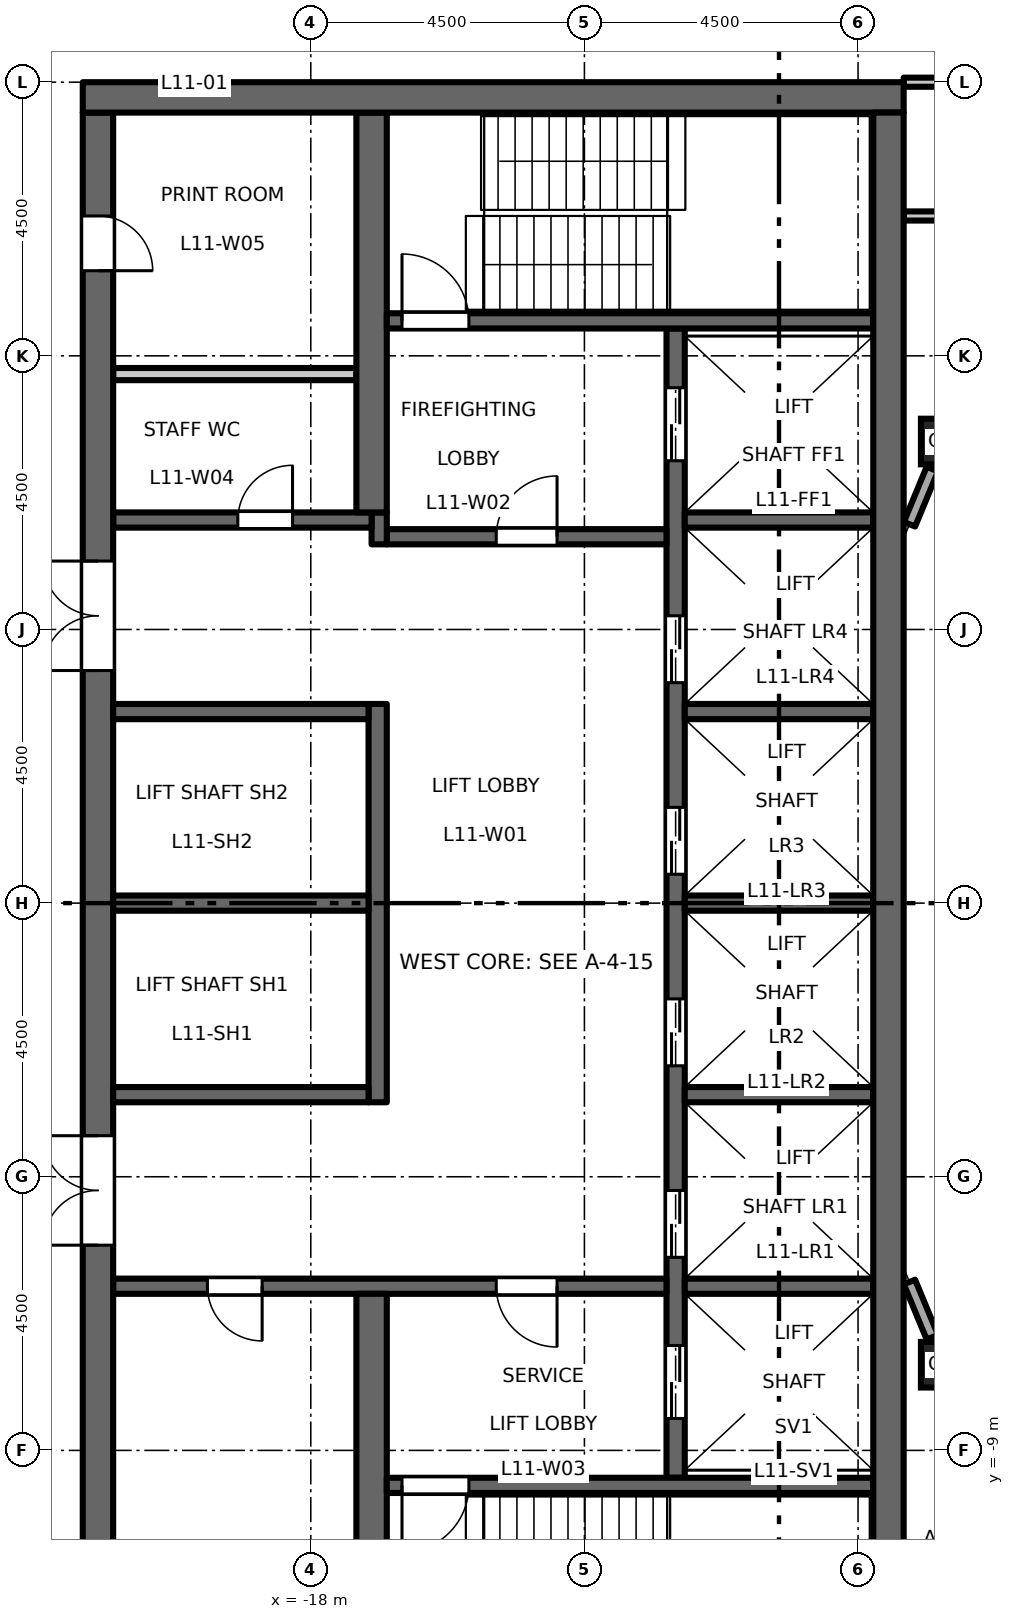
"""IFC4 building model, lengths in metres.
Left out: names, types, materials, properties, quantities, classifications, styles, units other than length and angle.
Written with IfcOpenShell. Run it as: python <this file> out.ifc"""

import sys

from ifc_helpers import new_model, si_unit, direction, frame, frame_2d, origin, origin_2d, place, context, subcontext, project, spatial, rectangle, hollow_rectangle, extrude, element, fill, save


model = new_model("IFC4")
c1 = context("Model", 3, precision=1e-05, world=origin(), true_north=direction((0.0, 1.0)))
c2 = subcontext(c1, "Body", "Model", "MODEL_VIEW")
j1 = project(units=[si_unit("LENGTHUNIT", "METRE"), si_unit("PLANEANGLEUNIT", "RADIAN")], contexts=[c1])
p1 = place(None, origin())
s1 = spatial("IfcSite", under=j1, at=p1, CompositionType="ELEMENT")
p2 = place(p1, origin())
s2 = spatial("IfcBuilding", under=s1, at=p2, CompositionType="ELEMENT")
p3 = place(p2, frame((0.0, 0.0, 53.7)))
s3 = spatial("IfcBuildingStorey", under=s2, at=p3, CompositionType="ELEMENT", Elevation=53.7)
for number, where, z_axis, x_axis in (
    (1, (-7.591, -7.591, 0.0), (0.0, 0.0, 1.0), (1.0, 0.0, 0.0)),
    (2, (-7.591, 7.591, 0.0), (0.0, 0.0, 1.0), (1.0, 0.0, 0.0)),
):
    element("IfcColumn", number, at=place(p3, frame(where, z_axis=z_axis, x_axis=x_axis)), inside=s3, PredefinedType="COLUMN", context=c2, shape_type="SweptSolid", body=[
        extrude(hollow_rectangle(XDim=0.75, YDim=0.75, WallThickness=0.045, at=origin_2d()), origin(), (0.0, 0.0, 1.0), 4.5),
    ])
p4 = place(p3, frame((-12.0, -9.45, 0.0), z_axis=(0.0, 0.0, 1.0), x_axis=(0.0, 1.0, 0.0)))
e3 = element("IfcWall", 3, at=p4, inside=s3, PredefinedType="SHEAR", context=c2, shape_type="SweptSolid", body=[
    extrude(rectangle(XDim=18.9, YDim=0.3, at=frame_2d((9.45, 0.0))), origin(), (0.0, 0.0, 1.0), 4.35),
])
p5 = place(p4, frame((3.625, 0.0, 0.0)))
e4 = element("IfcOpeningElement", 4, at=p5, cuts=e3, PredefinedType="OPENING", context=c2, shape_type="SweptSolid", body=[
    extrude(rectangle(XDim=1.1, YDim=2.1, at=frame_2d((0.55, 1.05))), frame((0.0, 0.16, 0.0), z_axis=(0.0, -1.0, 0.0), x_axis=(1.0, 0.0, 0.0)), (0.0, 0.0, 1.0), 0.32),
])
p6 = place(p4, frame((6.775, 0.0, 0.0)))
e5 = element("IfcOpeningElement", 5, at=p6, cuts=e3, PredefinedType="OPENING", context=c2, shape_type="SweptSolid", body=[
    extrude(rectangle(XDim=1.1, YDim=2.1, at=frame_2d((0.55, 1.05))), frame((0.0, 0.16, 0.0), z_axis=(0.0, -1.0, 0.0), x_axis=(1.0, 0.0, 0.0)), (0.0, 0.0, 1.0), 0.32),
])
p7 = place(p4, frame((9.925, 0.0, 0.0)))
e6 = element("IfcOpeningElement", 6, at=p7, cuts=e3, PredefinedType="OPENING", context=c2, shape_type="SweptSolid", body=[
    extrude(rectangle(XDim=1.1, YDim=2.1, at=frame_2d((0.55, 1.05))), frame((0.0, 0.16, 0.0), z_axis=(0.0, -1.0, 0.0), x_axis=(1.0, 0.0, 0.0)), (0.0, 0.0, 1.0), 0.32),
])
p8 = place(p4, frame((13.075, 0.0, 0.0)))
e7 = element("IfcOpeningElement", 7, at=p8, cuts=e3, PredefinedType="OPENING", context=c2, shape_type="SweptSolid", body=[
    extrude(rectangle(XDim=1.1, YDim=2.1, at=frame_2d((0.55, 1.05))), frame((0.0, 0.16, 0.0), z_axis=(0.0, -1.0, 0.0), x_axis=(1.0, 0.0, 0.0)), (0.0, 0.0, 1.0), 0.32),
])
p9 = place(p4, frame((16.725, 0.0, 0.0)))
e8 = element("IfcOpeningElement", 8, at=p9, cuts=e3, PredefinedType="OPENING", context=c2, shape_type="SweptSolid", body=[
    extrude(rectangle(XDim=1.2, YDim=2.1, at=frame_2d((0.6, 1.05))), frame((0.0, 0.16, 0.0), z_axis=(0.0, -1.0, 0.0), x_axis=(1.0, 0.0, 0.0)), (0.0, 0.0, 1.0), 0.32),
])
p10 = place(p4, frame((0.975, 0.0, 0.0)))
e9 = element("IfcOpeningElement", 9, at=p10, cuts=e3, PredefinedType="OPENING", context=c2, shape_type="SweptSolid", body=[
    extrude(rectangle(XDim=1.2, YDim=2.1, at=frame_2d((0.6, 1.05))), frame((0.0, 0.16, 0.0), z_axis=(0.0, -1.0, 0.0), x_axis=(1.0, 0.0, 0.0)), (0.0, 0.0, 1.0), 0.32),
])
p11 = place(p3, frame((-12.15, 6.025, 0.0), z_axis=(0.0, 0.0, 1.0), x_axis=(-1.0, 0.0, 0.0)))
e10 = element("IfcWall", 10, at=p11, inside=s3, PredefinedType="SHEAR", context=c2, shape_type="SweptSolid", body=[
    extrude(rectangle(XDim=4.6, YDim=0.25, at=frame_2d((2.3, 0.0))), origin(), (0.0, 0.0, 1.0), 4.35),
])
p12 = place(p11, frame((1.8, 0.0, 0.0)))
e11 = element("IfcOpeningElement", 11, at=p12, cuts=e10, PredefinedType="OPENING", context=c2, shape_type="SweptSolid", body=[
    extrude(rectangle(XDim=1.0, YDim=2.1, at=frame_2d((0.5, 1.05))), frame((0.0, 0.135, 0.0), z_axis=(0.0, -1.0, 0.0), x_axis=(1.0, 0.0, 0.0)), (0.0, 0.0, 1.0), 0.27),
])
p13 = place(p3, frame((-16.875, 5.9, 0.0), z_axis=(0.0, 0.0, 1.0), x_axis=(0.0, 1.0, 0.0)))
e12 = element("IfcWall", 12, at=p13, inside=s3, PredefinedType="SHEAR", context=c2, shape_type="SweptSolid", body=[
    extrude(rectangle(XDim=0.525, YDim=0.25, at=frame_2d((0.263, 0.0))), origin(), (0.0, 0.0, 1.0), 4.35),
])
p14 = place(p3, frame((-17.0, 6.3, 0.0), z_axis=(0.0, 0.0, 1.0), x_axis=(-1.0, 0.0, 0.0)))
e13 = element("IfcWall", 13, at=p14, inside=s3, PredefinedType="SHEAR", context=c2, shape_type="SweptSolid", body=[
    extrude(rectangle(XDim=4.25, YDim=0.25, at=frame_2d((2.125, 0.0))), origin(), (0.0, 0.0, 1.0), 4.35),
])
p15 = place(p14, frame((1.3, 0.0, 0.0)))
e14 = element("IfcOpeningElement", 14, at=p15, cuts=e13, PredefinedType="OPENING", context=c2, shape_type="SweptSolid", body=[
    extrude(rectangle(XDim=0.9, YDim=2.1, at=frame_2d((0.45, 1.05))), frame((0.0, 0.135, 0.0), z_axis=(0.0, -1.0, 0.0), x_axis=(1.0, 0.0, 0.0)), (0.0, 0.0, 1.0), 0.27),
])
p16 = place(p3, frame((-12.15, -6.3, 0.0), z_axis=(0.0, 0.0, 1.0), x_axis=(-1.0, 0.0, 0.0)))
e15 = element("IfcWall", 15, at=p16, inside=s3, PredefinedType="SHEAR", context=c2, shape_type="SweptSolid", body=[
    extrude(rectangle(XDim=9.1, YDim=0.25, at=frame_2d((4.55, 0.0))), origin(), (0.0, 0.0, 1.0), 4.35),
])
p17 = place(p16, frame((1.8, 0.0, 0.0)))
e16 = element("IfcOpeningElement", 16, at=p17, cuts=e15, PredefinedType="OPENING", context=c2, shape_type="SweptSolid", body=[
    extrude(rectangle(XDim=1.0, YDim=2.1, at=frame_2d((0.5, 1.05))), frame((0.0, 0.135, 0.0), z_axis=(0.0, -1.0, 0.0), x_axis=(1.0, 0.0, 0.0)), (0.0, 0.0, 1.0), 0.27),
])
p18 = place(p16, frame((6.65, 0.0, 0.0)))
e17 = element("IfcOpeningElement", 17, at=p18, cuts=e15, PredefinedType="OPENING", context=c2, shape_type="SweptSolid", body=[
    extrude(rectangle(XDim=0.9, YDim=2.1, at=frame_2d((0.45, 1.05))), frame((0.0, 0.135, 0.0), z_axis=(0.0, -1.0, 0.0), x_axis=(1.0, 0.0, 0.0)), (0.0, 0.0, 1.0), 0.27),
])
p19 = place(p3, frame((-21.5, -13.0, 0.0), z_axis=(0.0, 0.0, 1.0), x_axis=(0.0, 1.0, 0.0)))
e18 = element("IfcWall", 18, at=p19, inside=s3, PredefinedType="SHEAR", context=c2, shape_type="SweptSolid", body=[
    extrude(rectangle(XDim=26.0, YDim=0.5, at=frame_2d((13.0, 0.0))), origin(), (0.0, 0.0, 1.0), 4.35),
])
p20 = place(p19, frame((16.825, 0.0, 0.0)))
e19 = element("IfcOpeningElement", 19, at=p20, cuts=e18, PredefinedType="OPENING", context=c2, shape_type="SweptSolid", body=[
    extrude(rectangle(XDim=1.8, YDim=2.1, at=frame_2d((0.9, 1.05))), frame((0.0, 0.26, 0.0), z_axis=(0.0, -1.0, 0.0), x_axis=(1.0, 0.0, 0.0)), (0.0, 0.0, 1.0), 0.52),
])
p21 = place(p19, frame((7.375, 0.0, 0.0)))
e20 = element("IfcOpeningElement", 20, at=p21, cuts=e18, PredefinedType="OPENING", context=c2, shape_type="SweptSolid", body=[
    extrude(rectangle(XDim=1.8, YDim=2.1, at=frame_2d((0.9, 1.05))), frame((0.0, 0.26, 0.0), z_axis=(0.0, -1.0, 0.0), x_axis=(1.0, 0.0, 0.0)), (0.0, 0.0, 1.0), 0.52),
])
p22 = place(p19, frame((23.4, 0.0, 0.0)))
e21 = element("IfcOpeningElement", 21, at=p22, cuts=e18, PredefinedType="OPENING", context=c2, shape_type="SweptSolid", body=[
    extrude(rectangle(XDim=0.9, YDim=2.1, at=frame_2d((0.45, 1.05))), frame((0.0, 0.26, 0.0), z_axis=(0.0, -1.0, 0.0), x_axis=(1.0, 0.0, 0.0)), (0.0, 0.0, 1.0), 0.52),
])
p23 = place(p3, frame((-17.25, 8.7, 0.0), z_axis=(0.0, 0.0, 1.0), x_axis=(-1.0, 0.0, 0.0)))
e22 = element("IfcWall", 22, at=p23, inside=s3, PredefinedType="PARTITIONING", context=c2, shape_type="SweptSolid", body=[
    extrude(rectangle(XDim=4.0, YDim=0.2, at=frame_2d((2.0, 0.0))), origin(), (0.0, 0.0, 1.0), 4.35),
])
p24 = place(p3, frame((-16.9, -3.275, 0.0), z_axis=(0.0, 0.0, 1.0), x_axis=(0.0, 1.0, 0.0)))
e23 = element("IfcWall", 23, at=p24, inside=s3, PredefinedType="SHEAR", context=c2, shape_type="SweptSolid", body=[
    extrude(rectangle(XDim=6.55, YDim=0.3, at=frame_2d((3.275, 0.0))), origin(), (0.0, 0.0, 1.0), 4.35),
])
for number, where, z_axis, x_axis in (
    (24, (-17.05, 0.0, 0.0), (0.0, 0.0, 1.0), (-1.0, 0.0, 0.0)),
    (25, (-17.05, 3.15, 0.0), (0.0, 0.0, 1.0), (-1.0, 0.0, 0.0)),
    (26, (-17.05, -3.15, 0.0), (0.0, 0.0, 1.0), (-1.0, 0.0, 0.0)),
):
    element("IfcWall", number, at=place(p3, frame(where, z_axis=z_axis, x_axis=x_axis)), inside=s3, PredefinedType="SHEAR", context=c2, shape_type="SweptSolid", body=[
        extrude(rectangle(XDim=4.2, YDim=0.25, at=frame_2d((2.1, 0.0))), origin(), (0.0, 0.0, 1.0), 4.35),
    ])
for number, where, z_axis, x_axis in (
    (27, (-17.0, 6.425, 0.0), (0.0, 0.0, 1.0), (0.0, 1.0, 0.0)),
    (28, (-17.0, -13.0, 0.0), (0.0, 0.0, 1.0), (0.0, 1.0, 0.0)),
):
    element("IfcWall", number, at=place(p3, frame(where, z_axis=z_axis, x_axis=x_axis)), inside=s3, PredefinedType="SHEAR", context=c2, shape_type="SweptSolid", body=[
        extrude(rectangle(XDim=6.575, YDim=0.5, at=frame_2d((3.288, 0.0))), origin(), (0.0, 0.0, 1.0), 4.35),
    ])
for number, where, z_axis, x_axis in (
    (29, (-8.75, 0.0, 0.0), (0.0, 0.0, 1.0), (-1.0, 0.0, 0.0)),
    (30, (-8.75, 3.15, 0.0), (0.0, 0.0, 1.0), (-1.0, 0.0, 0.0)),
    (31, (-8.75, 6.3, 0.0), (0.0, 0.0, 1.0), (-1.0, 0.0, 0.0)),
    (32, (-8.75, -3.15, 0.0), (0.0, 0.0, 1.0), (-1.0, 0.0, 0.0)),
    (33, (-8.75, -6.3, 0.0), (0.0, 0.0, 1.0), (-1.0, 0.0, 0.0)),
):
    element("IfcWall", number, at=place(p3, frame(where, z_axis=z_axis, x_axis=x_axis)), inside=s3, PredefinedType="SHEAR", context=c2, shape_type="SweptSolid", body=[
        extrude(rectangle(XDim=3.1, YDim=0.25, at=frame_2d((1.55, 0.0))), origin(), (0.0, 0.0, 1.0), 4.35),
    ])
p25 = place(p3, frame((-8.75, 9.575, 0.0), z_axis=(0.0, 0.0, 1.0), x_axis=(-1.0, 0.0, 0.0)))
e34 = element("IfcWall", 34, at=p25, inside=s3, PredefinedType="SHEAR", context=c2, shape_type="SweptSolid", body=[
    extrude(rectangle(XDim=8.0, YDim=0.25, at=frame_2d((4.0, 0.0))), origin(), (0.0, 0.0, 1.0), 4.35),
])
p26 = place(p25, frame((6.65, 0.0, 0.0)))
e35 = element("IfcOpeningElement", 35, at=p26, cuts=e34, PredefinedType="OPENING", context=c2, shape_type="SweptSolid", body=[
    extrude(rectangle(XDim=1.1, YDim=2.1, at=frame_2d((0.55, 1.05))), frame((0.0, 0.135, 0.0), z_axis=(0.0, -1.0, 0.0), x_axis=(1.0, 0.0, 0.0)), (0.0, 0.0, 1.0), 0.27),
])
p27 = place(p3, frame((-8.75, -9.575, 0.0), z_axis=(0.0, 0.0, 1.0), x_axis=(-1.0, 0.0, 0.0)))
e36 = element("IfcWall", 36, at=p27, inside=s3, PredefinedType="SHEAR", context=c2, shape_type="SweptSolid", body=[
    extrude(rectangle(XDim=8.0, YDim=0.25, at=frame_2d((4.0, 0.0))), origin(), (0.0, 0.0, 1.0), 4.35),
])
p28 = place(p27, frame((6.65, 0.0, 0.0)))
e37 = element("IfcOpeningElement", 37, at=p28, cuts=e36, PredefinedType="OPENING", context=c2, shape_type="SweptSolid", body=[
    extrude(rectangle(XDim=1.1, YDim=2.1, at=frame_2d((0.55, 1.05))), frame((0.0, 0.135, 0.0), z_axis=(0.0, -1.0, 0.0), x_axis=(1.0, 0.0, 0.0)), (0.0, 0.0, 1.0), 0.27),
])
p29 = place(p3, frame((-8.25, 13.25, 0.0), z_axis=(0.0, 0.0, 1.0), x_axis=(-1.0, 0.0, 0.0)))
e38 = element("IfcWall", 38, at=p29, inside=s3, PredefinedType="SHEAR", context=c2, shape_type="SweptSolid", body=[
    extrude(rectangle(XDim=13.5, YDim=0.5, at=frame_2d((6.75, 0.0))), origin(), (0.0, 0.0, 1.0), 4.35),
])
p30 = place(p3, frame((-8.5, -13.0, 0.0), z_axis=(0.0, 0.0, 1.0), x_axis=(0.0, 1.0, 0.0)))
e39 = element("IfcWall", 39, at=p30, inside=s3, PredefinedType="SHEAR", context=c2, shape_type="SweptSolid", body=[
    extrude(rectangle(XDim=26.0, YDim=0.5, at=frame_2d((13.0, 0.0))), origin(), (0.0, 0.0, 1.0), 4.35),
])
for number, where, z_axis, x_axis in (
    (40, (-7.779, 7.138, 0.0), (0.0, 0.0, 1.0), (-0.383, -0.924, 0.0)),
    (41, (-8.154, -6.231, 0.0), (0.0, 0.0, 1.0), (0.383, -0.924, 0.0)),
):
    element("IfcWall", number, at=place(p3, frame(where, z_axis=z_axis, x_axis=x_axis)), inside=s3, PredefinedType="STANDARD", context=c2, shape_type="SweptSolid", body=[
        extrude(rectangle(XDim=0.982, YDim=0.2, at=frame_2d((0.491, 0.0))), origin(), (0.0, 0.0, 1.0), 3.73),
    ])
p31 = place(p3, frame((-8.25, 11.3, 0.0), z_axis=(0.0, 0.0, 1.0), x_axis=(1.0, 0.0, 0.0)))
e42 = element("IfcWall", 42, at=p31, inside=s3, PredefinedType="PARTITIONING", context=c2, shape_type="SweptSolid", body=[
    extrude(rectangle(XDim=15.03, YDim=0.15, at=frame_2d((7.515, 0.0))), origin(), (0.0, 0.0, 1.0), 4.35),
])
p32 = place(p31, frame((2.4, 0.0, 0.0)))
e43 = element("IfcOpeningElement", 43, at=p32, cuts=e42, PredefinedType="OPENING", context=c2, shape_type="SweptSolid", body=[
    extrude(rectangle(XDim=1.0, YDim=2.1, at=frame_2d((0.5, 1.05))), frame((0.0, 0.085, 0.0), z_axis=(0.0, -1.0, 0.0), x_axis=(1.0, 0.0, 0.0)), (0.0, 0.0, 1.0), 0.17),
])
p33 = place(p31, frame((8.65, 0.0, 0.0)))
e44 = element("IfcOpeningElement", 44, at=p33, cuts=e42, PredefinedType="OPENING", context=c2, shape_type="SweptSolid", body=[
    extrude(rectangle(XDim=1.0, YDim=2.1, at=frame_2d((0.5, 1.05))), frame((0.0, 0.085, 0.0), z_axis=(0.0, -1.0, 0.0), x_axis=(1.0, 0.0, 0.0)), (0.0, 0.0, 1.0), 0.17),
])
p34 = place(p31, frame((12.9, 0.0, 0.0)))
e45 = element("IfcOpeningElement", 45, at=p34, cuts=e42, PredefinedType="OPENING", context=c2, shape_type="SweptSolid", body=[
    extrude(rectangle(XDim=1.0, YDim=2.1, at=frame_2d((0.5, 1.05))), frame((0.0, 0.085, 0.0), z_axis=(0.0, -1.0, 0.0), x_axis=(1.0, 0.0, 0.0)), (0.0, 0.0, 1.0), 0.17),
])
p35 = place(p3, frame((-8.25, 13.5, 0.0), z_axis=(0.0, 0.0, 1.0), x_axis=(1.0, 0.0, 0.0)))
e46 = element("IfcWall", 46, at=p35, inside=s3, PredefinedType="PARTITIONING", context=c2, shape_type="SweptSolid", body=[
    extrude(rectangle(XDim=16.5, YDim=0.15, at=frame_2d((8.25, 0.0))), origin(), (0.0, 0.0, 1.0), 3.85),
])
p36 = place(p35, frame((7.65, 0.0, 0.0)))
e47 = element("IfcOpeningElement", 47, at=p36, cuts=e46, PredefinedType="OPENING", context=c2, shape_type="SweptSolid", body=[
    extrude(rectangle(XDim=1.0, YDim=2.1, at=frame_2d((0.5, 1.05))), frame((0.0, 0.085, 0.0), z_axis=(0.0, -1.0, 0.0), x_axis=(1.0, 0.0, 0.0)), (0.0, 0.0, 1.0), 0.17),
])
p37 = place(p12, origin())
e48 = element("IfcDoor", 48, at=p37, inside=s3, OperationType="SINGLE_SWING_LEFT", PredefinedType="DOOR", context=c2, shape_type="SweptSolid", body=[
    extrude(rectangle(XDim=1.0, YDim=2.1, at=frame_2d((0.5, 1.05))), frame((0.0, 0.025, 0.0), z_axis=(0.0, -1.0, 0.0), x_axis=(1.0, 0.0, 0.0)), (0.0, 0.0, 1.0), 0.05),
])
fill(e11, e48)
p38 = place(p17, origin())
e49 = element("IfcDoor", 49, at=p38, inside=s3, OperationType="SINGLE_SWING_RIGHT", PredefinedType="DOOR", context=c2, shape_type="SweptSolid", body=[
    extrude(rectangle(XDim=1.0, YDim=2.1, at=frame_2d((0.5, 1.05))), frame((0.0, 0.025, 0.0), z_axis=(0.0, -1.0, 0.0), x_axis=(1.0, 0.0, 0.0)), (0.0, 0.0, 1.0), 0.05),
])
fill(e16, e49)
p39 = place(p26, origin())
e50 = element("IfcDoor", 50, at=p39, inside=s3, OperationType="SINGLE_SWING_RIGHT", PredefinedType="DOOR", context=c2, shape_type="SweptSolid", body=[
    extrude(rectangle(XDim=1.1, YDim=2.1, at=frame_2d((0.55, 1.05))), frame((0.0, 0.025, 0.0), z_axis=(0.0, -1.0, 0.0), x_axis=(1.0, 0.0, 0.0)), (0.0, 0.0, 1.0), 0.05),
])
fill(e35, e50)
p40 = place(p28, origin())
e51 = element("IfcDoor", 51, at=p40, inside=s3, OperationType="SINGLE_SWING_LEFT", PredefinedType="DOOR", context=c2, shape_type="SweptSolid", body=[
    extrude(rectangle(XDim=1.1, YDim=2.1, at=frame_2d((0.55, 1.05))), frame((0.0, 0.025, 0.0), z_axis=(0.0, -1.0, 0.0), x_axis=(1.0, 0.0, 0.0)), (0.0, 0.0, 1.0), 0.05),
])
fill(e37, e51)
p41 = place(p20, origin())
e52 = element("IfcDoor", 52, at=p41, inside=s3, OperationType="DOUBLE_DOOR_DOUBLE_SWING", PredefinedType="DOOR", context=c2, shape_type="SweptSolid", body=[
    extrude(rectangle(XDim=1.8, YDim=2.1, at=frame_2d((0.9, 1.05))), frame((0.0, 0.025, 0.0), z_axis=(0.0, -1.0, 0.0), x_axis=(1.0, 0.0, 0.0)), (0.0, 0.0, 1.0), 0.05),
])
fill(e19, e52)
p42 = place(p21, origin())
e53 = element("IfcDoor", 53, at=p42, inside=s3, OperationType="DOUBLE_DOOR_DOUBLE_SWING", PredefinedType="DOOR", context=c2, shape_type="SweptSolid", body=[
    extrude(rectangle(XDim=1.8, YDim=2.1, at=frame_2d((0.9, 1.05))), frame((0.0, 0.025, 0.0), z_axis=(0.0, -1.0, 0.0), x_axis=(1.0, 0.0, 0.0)), (0.0, 0.0, 1.0), 0.05),
])
fill(e20, e53)
p43 = place(p5, origin())
e54 = element("IfcDoor", 54, at=p43, inside=s3, OperationType="DOUBLE_DOOR_SLIDING", PredefinedType="DOOR", context=c2, shape_type="SweptSolid", body=[
    extrude(rectangle(XDim=1.1, YDim=2.1, at=frame_2d((0.55, 1.05))), frame((0.0, 0.025, 0.0), z_axis=(0.0, -1.0, 0.0), x_axis=(1.0, 0.0, 0.0)), (0.0, 0.0, 1.0), 0.05),
])
fill(e4, e54)
p44 = place(p6, origin())
e55 = element("IfcDoor", 55, at=p44, inside=s3, OperationType="DOUBLE_DOOR_SLIDING", PredefinedType="DOOR", context=c2, shape_type="SweptSolid", body=[
    extrude(rectangle(XDim=1.1, YDim=2.1, at=frame_2d((0.55, 1.05))), frame((0.0, 0.025, 0.0), z_axis=(0.0, -1.0, 0.0), x_axis=(1.0, 0.0, 0.0)), (0.0, 0.0, 1.0), 0.05),
])
fill(e5, e55)
p45 = place(p7, origin())
e56 = element("IfcDoor", 56, at=p45, inside=s3, OperationType="DOUBLE_DOOR_SLIDING", PredefinedType="DOOR", context=c2, shape_type="SweptSolid", body=[
    extrude(rectangle(XDim=1.1, YDim=2.1, at=frame_2d((0.55, 1.05))), frame((0.0, 0.025, 0.0), z_axis=(0.0, -1.0, 0.0), x_axis=(1.0, 0.0, 0.0)), (0.0, 0.0, 1.0), 0.05),
])
fill(e6, e56)
p46 = place(p8, origin())
e57 = element("IfcDoor", 57, at=p46, inside=s3, OperationType="DOUBLE_DOOR_SLIDING", PredefinedType="DOOR", context=c2, shape_type="SweptSolid", body=[
    extrude(rectangle(XDim=1.1, YDim=2.1, at=frame_2d((0.55, 1.05))), frame((0.0, 0.025, 0.0), z_axis=(0.0, -1.0, 0.0), x_axis=(1.0, 0.0, 0.0)), (0.0, 0.0, 1.0), 0.05),
])
fill(e7, e57)
p47 = place(p9, origin())
e58 = element("IfcDoor", 58, at=p47, inside=s3, OperationType="DOUBLE_DOOR_SLIDING", PredefinedType="DOOR", context=c2, shape_type="SweptSolid", body=[
    extrude(rectangle(XDim=1.2, YDim=2.1, at=frame_2d((0.6, 1.05))), frame((0.0, 0.025, 0.0), z_axis=(0.0, -1.0, 0.0), x_axis=(1.0, 0.0, 0.0)), (0.0, 0.0, 1.0), 0.05),
])
fill(e8, e58)
p48 = place(p10, origin())
e59 = element("IfcDoor", 59, at=p48, inside=s3, OperationType="DOUBLE_DOOR_SLIDING", PredefinedType="DOOR", context=c2, shape_type="SweptSolid", body=[
    extrude(rectangle(XDim=1.2, YDim=2.1, at=frame_2d((0.6, 1.05))), frame((0.0, 0.025, 0.0), z_axis=(0.0, -1.0, 0.0), x_axis=(1.0, 0.0, 0.0)), (0.0, 0.0, 1.0), 0.05),
])
fill(e9, e59)
p49 = place(p15, origin())
e60 = element("IfcDoor", 60, at=p49, inside=s3, OperationType="SINGLE_SWING_LEFT", PredefinedType="DOOR", context=c2, shape_type="SweptSolid", body=[
    extrude(rectangle(XDim=0.9, YDim=2.1, at=frame_2d((0.45, 1.05))), frame((0.0, 0.025, 0.0), z_axis=(0.0, -1.0, 0.0), x_axis=(1.0, 0.0, 0.0)), (0.0, 0.0, 1.0), 0.05),
])
fill(e14, e60)
p50 = place(p22, origin())
e61 = element("IfcDoor", 61, at=p50, inside=s3, OperationType="SINGLE_SWING_LEFT", PredefinedType="DOOR", context=c2, shape_type="SweptSolid", body=[
    extrude(rectangle(XDim=0.9, YDim=2.1, at=frame_2d((0.45, 1.05))), frame((0.0, 0.025, 0.0), z_axis=(0.0, -1.0, 0.0), x_axis=(1.0, 0.0, 0.0)), (0.0, 0.0, 1.0), 0.05),
])
fill(e21, e61)
p51 = place(p18, origin())
e62 = element("IfcDoor", 62, at=p51, inside=s3, OperationType="SINGLE_SWING_RIGHT", PredefinedType="DOOR", context=c2, shape_type="SweptSolid", body=[
    extrude(rectangle(XDim=0.9, YDim=2.1, at=frame_2d((0.45, 1.05))), frame((0.0, 0.025, 0.0), z_axis=(0.0, -1.0, 0.0), x_axis=(1.0, 0.0, 0.0)), (0.0, 0.0, 1.0), 0.05),
])
fill(e17, e62)
save(model, sys.argv[1])
